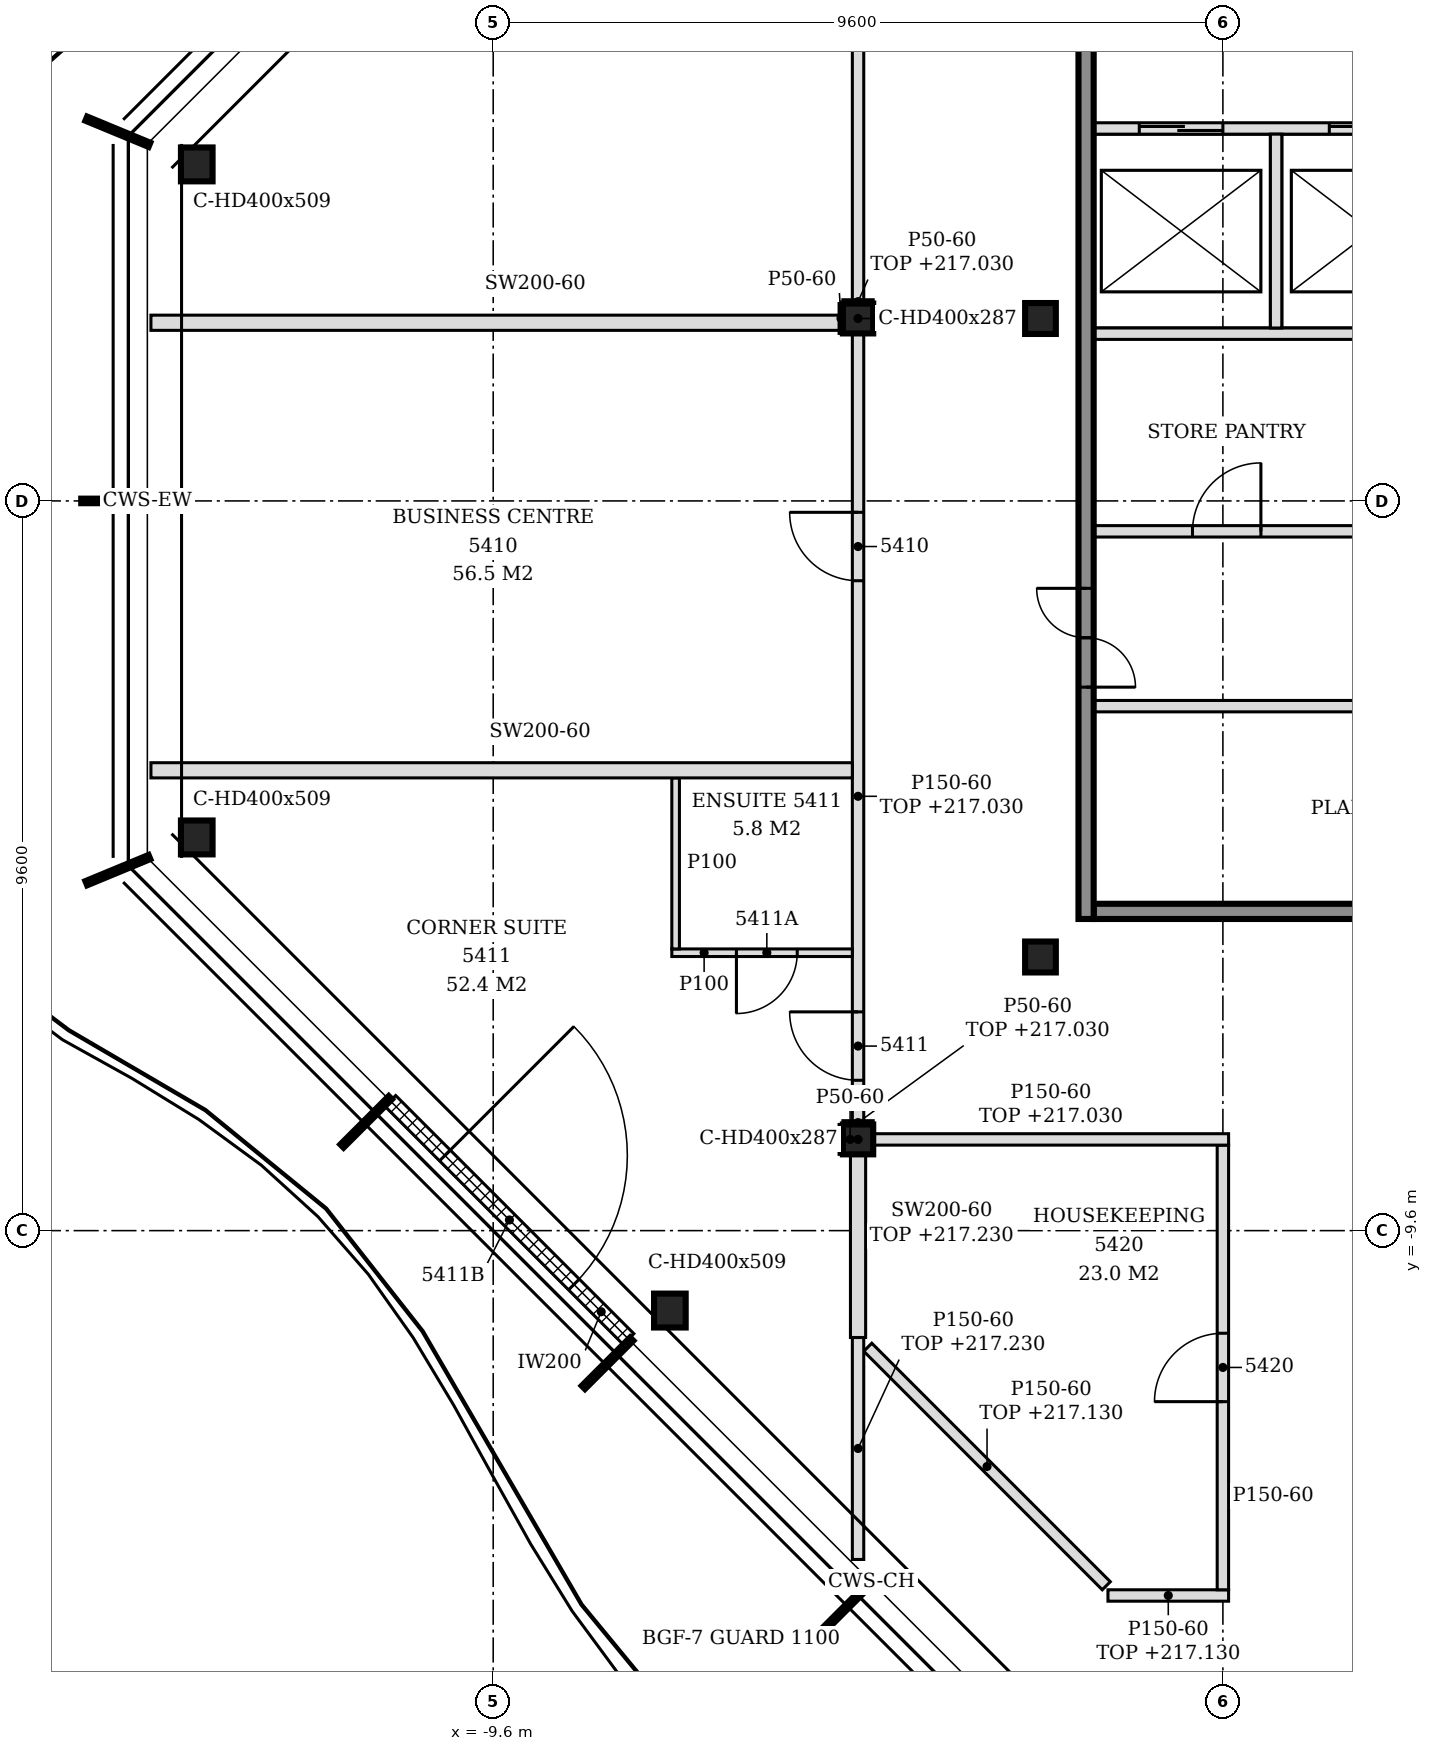
"""IFC4 building model, lengths in metres.
Left out: names, types, materials, properties, quantities, classifications, styles, units other than length and angle.
Written with IfcOpenShell. Run it as: python <this file> out.ifc"""

import sys

from ifc_helpers import new_model, si_unit, direction, frame, frame_2d, origin, origin_2d, place, context, subcontext, project, spatial, polyline, rectangle, i_section, outline, extrude, element, fill, save


model = new_model("IFC4")
c1 = context("Model", 3, precision=1e-05, world=origin(), true_north=direction((0.0, 1.0)))
c2 = subcontext(c1, "Body", "Model", "MODEL_VIEW")
j1 = project(units=[si_unit("LENGTHUNIT", "METRE"), si_unit("PLANEANGLEUNIT", "RADIAN")], contexts=[c1])
p1 = place(None, origin())
s1 = spatial("IfcSite", under=j1, at=p1, CompositionType="ELEMENT")
p2 = place(p1, origin())
s2 = spatial("IfcBuilding", under=s1, at=p2, CompositionType="ELEMENT")
p3 = place(p2, frame((0.0, 0.0, 214.2)))
s3 = spatial("IfcBuildingStorey", under=s2, at=p3, CompositionType="ELEMENT", Elevation=214.2)
for number, where, z_axis, x_axis in (
    (1, (-13.5, 4.427, -0.15), (0.0, 0.0, 1.0), (1.0, 0.0, 0.0)),
    (2, (-13.5, -4.427, -0.15), (0.0, 0.0, 1.0), (1.0, 0.0, 0.0)),
    (3, (-7.276, -10.652, -0.15), (0.0, 0.0, 1.0), (1.0, 0.0, 0.0)),
):
    element("IfcColumn", number, at=place(p3, frame(where, z_axis=z_axis, x_axis=x_axis)), inside=s3, PredefinedType="COLUMN", context=c2, shape_type="SweptSolid", body=[
        extrude(i_section(OverallWidth=0.416, OverallDepth=0.446, WebThickness=0.039, FlangeThickness=0.063, FilletRadius=0.015, at=origin_2d()), origin(), (0.0, 0.0, 1.0), 3.6),
    ])
for number, where, z_axis, x_axis in (
    (4, (-4.8, -8.4, -0.15), (0.0, 0.0, 1.0), (1.0, 0.0, 0.0)),
    (5, (-4.8, 2.4, -0.15), (0.0, 0.0, 1.0), (1.0, 0.0, 0.0)),
):
    element("IfcColumn", number, at=place(p3, frame(where, z_axis=z_axis, x_axis=x_axis)), inside=s3, PredefinedType="COLUMN", context=c2, shape_type="SweptSolid", body=[
        extrude(i_section(OverallWidth=0.399, OverallDepth=0.393, WebThickness=0.023, FlangeThickness=0.037, FilletRadius=0.015, at=origin_2d()), origin(), (0.0, 0.0, 1.0), 3.6),
    ])
for number, where, z_axis, x_axis in (
    (6, (-2.4, -6.0, -0.15), (0.0, 0.0, 1.0), (1.0, 0.0, 0.0)),
    (7, (-2.4, 2.4, -0.15), (0.0, 0.0, 1.0), (1.0, 0.0, 0.0)),
):
    element("IfcColumn", number, at=place(p3, frame(where, z_axis=z_axis, x_axis=x_axis)), inside=s3, PredefinedType="COLUMN", context=c2, shape_type="SweptSolid", body=[
        extrude(i_section(OverallWidth=0.404, OverallDepth=0.407, WebThickness=0.027, FlangeThickness=0.044, FilletRadius=0.015, at=origin_2d()), origin(), (0.0, 0.0, 1.0), 3.6),
    ])
p4 = place(p3, frame((-10.953, -7.893, 0.0), z_axis=(0.0, 0.0, 1.0), x_axis=(0.707106781187, -0.707106781187, 0.0)))
e8 = element("IfcWall", 8, at=p4, inside=s3, PredefinedType="NOTDEFINED", context=c2, shape_type="SweptSolid", body=[
    extrude(rectangle(XDim=4.431, YDim=0.2, at=frame_2d((2.215, 0.0))), origin(), (0.0, 0.0, 1.0), 3.45),
])
p5 = place(p4, frame((1.015, 0.0, 0.0)))
e9 = element("IfcOpeningElement", 9, at=p5, cuts=e8, PredefinedType="OPENING", context=c2, shape_type="SweptSolid", body=[
    extrude(rectangle(XDim=2.4, YDim=2.4, at=frame_2d((1.2, 1.2))), frame((0.0, 0.11, 0.0), z_axis=(0.0, -1.0, 0.0), x_axis=(1.0, 0.0, 0.0)), (0.0, 0.0, 1.0), 0.22),
])
p6 = place(p3, frame((-1.7, -5.4, 0.0), z_axis=(0.0, 0.0, 1.0), x_axis=(1.0, 0.0, 0.0)))
e10 = element("IfcWall", 10, at=p6, inside=s3, PredefinedType="SOLIDWALL", context=c2, shape_type="SweptSolid", body=[
    extrude(rectangle(XDim=7.9, YDim=0.2, at=frame_2d((3.95, 0.0))), origin(), (0.0, 0.0, 1.0), 3.45),
])
p7 = place(p3, frame((-1.7, -2.7, 0.0), z_axis=(0.0, 0.0, 1.0), x_axis=(1.0, 0.0, 0.0)))
e11 = element("IfcWall", 11, at=p7, inside=s3, PredefinedType="PARTITIONING", context=c2, shape_type="SweptSolid", body=[
    extrude(rectangle(XDim=7.825, YDim=0.15, at=frame_2d((3.913, 0.0))), origin(), (0.0, 0.0, 1.0), 3.45),
])
p8 = place(p7, frame((3.45, 0.0, 0.0)))
e12 = element("IfcOpeningElement", 12, at=p8, cuts=e11, PredefinedType="OPENING", context=c2, shape_type="SweptSolid", body=[
    extrude(rectangle(XDim=0.9, YDim=2.1, at=frame_2d((0.45, 1.05))), frame((0.0, 0.085, 0.0), z_axis=(0.0, -1.0, 0.0), x_axis=(1.0, 0.0, 0.0)), (0.0, 0.0, 1.0), 0.17),
])
p9 = place(p3, frame((-1.7, -0.4, 0.0), z_axis=(0.0, 0.0, 1.0), x_axis=(1.0, 0.0, 0.0)))
e13 = element("IfcWall", 13, at=p9, inside=s3, PredefinedType="PARTITIONING", context=c2, shape_type="SweptSolid", body=[
    extrude(rectangle(XDim=10.825, YDim=0.15, at=frame_2d((5.413, 0.0))), origin(), (0.0, 0.0, 1.0), 3.45),
])
p10 = place(p9, frame((1.3, 0.0, 0.0)))
e14 = element("IfcOpeningElement", 14, at=p10, cuts=e13, PredefinedType="OPENING", context=c2, shape_type="SweptSolid", body=[
    extrude(rectangle(XDim=0.9, YDim=2.1, at=frame_2d((0.45, 1.05))), frame((0.0, 0.085, 0.0), z_axis=(0.0, -1.0, 0.0), x_axis=(1.0, 0.0, 0.0)), (0.0, 0.0, 1.0), 0.17),
])
p11 = place(p9, frame((6.8, 0.0, 0.0)))
e15 = element("IfcOpeningElement", 15, at=p11, cuts=e13, PredefinedType="OPENING", context=c2, shape_type="SweptSolid", body=[
    extrude(rectangle(XDim=0.9, YDim=2.1, at=frame_2d((0.45, 1.05))), frame((0.0, 0.085, 0.0), z_axis=(0.0, -1.0, 0.0), x_axis=(1.0, 0.0, 0.0)), (0.0, 0.0, 1.0), 0.17),
])
p12 = place(p3, frame((-1.7, 2.2, 0.0), z_axis=(0.0, 0.0, 1.0), x_axis=(1.0, 0.0, 0.0)))
e16 = element("IfcWall", 16, at=p12, inside=s3, PredefinedType="SOLIDWALL", context=c2, shape_type="SweptSolid", body=[
    extrude(rectangle(XDim=4.9, YDim=0.15, at=frame_2d((2.45, 0.0))), origin(), (0.0, 0.0, 1.0), 3.45),
])
p13 = place(p3, frame((-1.7, 4.9, 0.0), z_axis=(0.0, 0.0, 1.0), x_axis=(1.0, 0.0, 0.0)))
e17 = element("IfcWall", 17, at=p13, inside=s3, PredefinedType="SOLIDWALL", context=c2, shape_type="SweptSolid", body=[
    extrude(rectangle(XDim=4.9, YDim=0.15, at=frame_2d((2.45, 0.0))), origin(), (0.0, 0.0, 1.0), 3.45),
])
p14 = place(p13, frame((0.6, 0.0, 0.0)))
e18 = element("IfcOpeningElement", 18, at=p14, cuts=e17, PredefinedType="OPENING", context=c2, shape_type="SweptSolid", body=[
    extrude(rectangle(XDim=1.1, YDim=2.1, at=frame_2d((0.55, 1.05))), frame((0.0, 0.085, 0.0), z_axis=(0.0, -1.0, 0.0), x_axis=(1.0, 0.0, 0.0)), (0.0, 0.0, 1.0), 0.17),
])
p15 = place(p13, frame((3.1, 0.0, 0.0)))
e19 = element("IfcOpeningElement", 19, at=p15, cuts=e17, PredefinedType="OPENING", context=c2, shape_type="SweptSolid", body=[
    extrude(rectangle(XDim=1.1, YDim=2.1, at=frame_2d((0.55, 1.05))), frame((0.0, 0.085, 0.0), z_axis=(0.0, -1.0, 0.0), x_axis=(1.0, 0.0, 0.0)), (0.0, 0.0, 1.0), 0.17),
])
p16 = place(p3, frame((-1.8, -5.5, 0.0), z_axis=(0.0, 0.0, 1.0), x_axis=(0.0, 1.0, 0.0)))
e20 = element("IfcWall", 20, at=p16, inside=s3, PredefinedType="SOLIDWALL", context=c2, shape_type="SweptSolid", body=[
    extrude(rectangle(XDim=15.8, YDim=0.2, at=frame_2d((7.9, 0.0))), origin(), (0.0, 0.0, 1.0), 3.45),
])
p17 = place(p16, frame((3.05, 0.0, 0.0)))
e21 = element("IfcOpeningElement", 21, at=p17, cuts=e20, PredefinedType="OPENING", context=c2, shape_type="SweptSolid", body=[
    extrude(rectangle(XDim=1.3, YDim=2.1, at=frame_2d((0.65, 1.05))), frame((0.0, 0.11, 0.0), z_axis=(0.0, -1.0, 0.0), x_axis=(1.0, 0.0, 0.0)), (0.0, 0.0, 1.0), 0.22),
])
p18 = place(p16, frame((11.45, 0.0, 0.0)))
e22 = element("IfcOpeningElement", 22, at=p18, cuts=e20, PredefinedType="OPENING", context=c2, shape_type="SweptSolid", body=[
    extrude(rectangle(XDim=1.3, YDim=2.1, at=frame_2d((0.65, 1.05))), frame((0.0, 0.11, 0.0), z_axis=(0.0, -1.0, 0.0), x_axis=(1.0, 0.0, 0.0)), (0.0, 0.0, 1.0), 0.22),
])
p19 = place(p3, frame((0.7, 2.275, 0.0), z_axis=(0.0, 0.0, 1.0), x_axis=(0.0, 1.0, 0.0)))
e23 = element("IfcWall", 23, at=p19, inside=s3, PredefinedType="SOLIDWALL", context=c2, shape_type="SweptSolid", body=[
    extrude(rectangle(XDim=2.55, YDim=0.15, at=frame_2d((1.275, 0.0))), origin(), (0.0, 0.0, 1.0), 3.45),
])
p20 = place(p3, frame((-1.512, -14.4, 0.0), z_axis=(0.0, 0.0, 1.0), x_axis=(1.0, 0.0, 0.0)))
e24 = element("IfcWall", 24, at=p20, inside=s3, PredefinedType="PARTITIONING", context=c2, shape_type="SweptSolid", body=[
    extrude(rectangle(XDim=1.587, YDim=0.15, at=frame_2d((0.793, 0.0))), origin(), (0.0, 0.0, 1.0), 2.93),
])
p21 = place(p3, frame((-1.534, -14.272, 0.0), z_axis=(0.0, 0.0, 1.0), x_axis=(-0.707134287042, 0.707079274261, 0.0)))
e25 = element("IfcWall", 25, at=p21, inside=s3, PredefinedType="PARTITIONING", context=c2, shape_type="SweptSolid", body=[
    extrude(rectangle(XDim=4.438, YDim=0.15, at=frame_2d((2.219, 0.0))), origin(), (0.0, 0.0, 1.0), 2.93),
])
p22 = place(p3, frame((0.0, -14.325, 0.0), z_axis=(0.0, 0.0, 1.0), x_axis=(0.0, 1.0, 0.0)))
e26 = element("IfcWall", 26, at=p22, inside=s3, PredefinedType="PARTITIONING", context=c2, shape_type="SweptSolid", body=[
    extrude(outline(polyline([(0.0, 0.0), (5.85, 0.0), (5.85, 2.83), (5.775, 2.83), (5.773, 3.45), (0.025, 3.45), (0.023, 2.93), (0.0, 2.93), (0.0, 0.0)])), frame((0.0, 0.075, 0.0), z_axis=(0.0, -1.0, 0.0), x_axis=(1.0, 0.0, 0.0)), (0.0, 0.0, 1.0), 0.15),
])
p23 = place(p22, frame((2.475, 0.0, 0.0)))
e27 = element("IfcOpeningElement", 27, at=p23, cuts=e26, PredefinedType="OPENING", context=c2, shape_type="SweptSolid", body=[
    extrude(rectangle(XDim=0.9, YDim=2.1, at=frame_2d((0.45, 1.05))), frame((0.0, 0.085, 0.0), z_axis=(0.0, -1.0, 0.0), x_axis=(1.0, 0.0, 0.0)), (0.0, 0.0, 1.0), 0.17),
])
p24 = place(p3, frame((-4.8, -13.926, 0.0), z_axis=(0.0, 0.0, 1.0), x_axis=(0.0, 1.0, 0.0)))
e28 = element("IfcWall", 28, at=p24, inside=s3, PredefinedType="PARTITIONING", context=c2, shape_type="SweptSolid", body=[
    extrude(outline(polyline([(0.0, 0.0), (2.92, 0.0), (2.92, 3.03), (1.369, 3.03), (1.367, 2.63), (0.229, 2.63), (0.227, 3.03), (0.0, 3.03), (0.0, 0.0)])), frame((0.0, 0.075, 0.0), z_axis=(0.0, -1.0, 0.0), x_axis=(1.0, 0.0, 0.0)), (0.0, 0.0, 1.0), 0.15),
])
p25 = place(p3, frame((-4.8, -11.006, 0.0), z_axis=(0.0, 0.0, 1.0), x_axis=(0.0, 1.0, 0.0)))
e29 = element("IfcWall", 29, at=p25, inside=s3, PredefinedType="PARTITIONING", context=c2, shape_type="SweptSolid", body=[
    extrude(rectangle(XDim=2.41, YDim=0.2, at=frame_2d((1.205, 0.0))), origin(), (0.0, 0.0, 1.0), 3.03),
])
p26 = place(p3, frame((-4.601, -8.4, 0.0), z_axis=(0.0, 0.0, 1.0), x_axis=(1.0, 0.0, 0.0)))
e30 = element("IfcWall", 30, at=p26, inside=s3, PredefinedType="PARTITIONING", context=c2, shape_type="SweptSolid", body=[
    extrude(rectangle(XDim=4.676, YDim=0.15, at=frame_2d((2.338, 0.0))), origin(), (0.0, 0.0, 1.0), 2.83),
])
p27 = place(p3, frame((-4.8, -8.204, 0.0), z_axis=(0.0, 0.0, 1.0), x_axis=(0.0, 1.0, 0.0)))
e31 = element("IfcWall", 31, at=p27, inside=s3, PredefinedType="PARTITIONING", context=c2, shape_type="SweptSolid", body=[
    extrude(rectangle(XDim=10.407, YDim=0.15, at=frame_2d((5.204, 0.0))), origin(), (0.0, 0.0, 1.0), 2.83),
])
p28 = place(p27, frame((7.154, 0.0, 0.0)))
e32 = element("IfcOpeningElement", 32, at=p28, cuts=e31, PredefinedType="OPENING", context=c2, shape_type="SweptSolid", body=[
    extrude(rectangle(XDim=0.9, YDim=2.1, at=frame_2d((0.45, 1.05))), frame((0.0, 0.085, 0.0), z_axis=(0.0, -1.0, 0.0), x_axis=(1.0, 0.0, 0.0)), (0.0, 0.0, 1.0), 0.17),
])
p29 = place(p27, frame((0.582, 0.0, 0.0)))
e33 = element("IfcOpeningElement", 33, at=p29, cuts=e31, PredefinedType="OPENING", context=c2, shape_type="SweptSolid", body=[
    extrude(rectangle(XDim=0.9, YDim=2.1, at=frame_2d((0.45, 1.05))), frame((0.0, 0.085, 0.0), z_axis=(0.0, -1.0, 0.0), x_axis=(1.0, 0.0, 0.0)), (0.0, 0.0, 1.0), 0.17),
])
p30 = place(p3, frame((-7.25, -5.944, 0.0), z_axis=(0.0, 0.0, 1.0), x_axis=(1.0, 0.0, 0.0)))
e34 = element("IfcWall", 34, at=p30, inside=s3, PredefinedType="PARTITIONING", context=c2, shape_type="SweptSolid", body=[
    extrude(outline(polyline([(0.0, 0.0), (2.375, 0.0), (2.375, 2.83), (2.3, 2.83), (2.298, 3.45), (0.0, 3.45), (0.0, 0.0)])), frame((0.0, 0.05, 0.0), z_axis=(0.0, -1.0, 0.0), x_axis=(1.0, 0.0, 0.0)), (0.0, 0.0, 1.0), 0.1),
])
p31 = place(p30, frame((0.85, 0.0, 0.0)))
e35 = element("IfcOpeningElement", 35, at=p31, cuts=e34, PredefinedType="OPENING", context=c2, shape_type="SweptSolid", body=[
    extrude(rectangle(XDim=0.8, YDim=2.1, at=frame_2d((0.4, 1.05))), frame((0.0, 0.06, 0.0), z_axis=(0.0, -1.0, 0.0), x_axis=(1.0, 0.0, 0.0)), (0.0, 0.0, 1.0), 0.12),
])
p32 = place(p3, frame((-7.2, -5.894, 0.0), z_axis=(0.0, 0.0, 1.0), x_axis=(0.0, 1.0, 0.0)))
e36 = element("IfcWall", 36, at=p32, inside=s3, PredefinedType="PARTITIONING", context=c2, shape_type="SweptSolid", body=[
    extrude(outline(polyline([(0.0, 0.0), (2.25, 0.0), (2.25, 3.45), (1.189, 3.45), (1.187, 2.98), (0.999, 2.98), (0.997, 3.45), (0.0, 3.45), (0.0, 0.0)])), frame((0.0, 0.05, 0.0), z_axis=(0.0, -1.0, 0.0), x_axis=(1.0, 0.0, 0.0)), (0.0, 0.0, 1.0), 0.1),
])
p33 = place(p3, frame((-14.103, -3.544, 0.0), z_axis=(0.0, 0.0, 1.0), x_axis=(1.0, 0.0, 0.0)))
e37 = element("IfcWall", 37, at=p33, inside=s3, PredefinedType="PARTITIONING", context=c2, shape_type="SweptSolid", body=[
    extrude(outline(polyline([(0.0, 0.0), (9.228, 0.0), (9.228, 2.83), (9.153, 2.83), (9.151, 3.45), (0.753, 3.45), (0.751, 2.93), (0.453, 2.93), (0.451, 3.45), (0.0, 3.45), (0.0, 0.0)])), frame((0.0, 0.1, 0.0), z_axis=(0.0, -1.0, 0.0), x_axis=(1.0, 0.0, 0.0)), (0.0, 0.0, 1.0), 0.2),
])
p34 = place(p3, frame((-14.103, 2.344, 0.0), z_axis=(0.0, 0.0, 1.0), x_axis=(1.0, 0.0, 0.0)))
e38 = element("IfcWall", 38, at=p34, inside=s3, PredefinedType="PARTITIONING", context=c2, shape_type="SweptSolid", body=[
    extrude(outline(polyline([(0.0, 0.0), (9.104, 0.0), (9.104, 3.45), (0.753, 3.45), (0.751, 2.93), (0.453, 2.93), (0.451, 3.45), (0.0, 3.45), (0.0, 0.0)])), frame((0.0, 0.1, 0.0), z_axis=(0.0, -1.0, 0.0), x_axis=(1.0, 0.0, 0.0)), (0.0, 0.0, 1.0), 0.2),
])
p35 = place(p3, frame((-4.8, 2.596, 0.0), z_axis=(0.0, 0.0, 1.0), x_axis=(0.0, 1.0, 0.0)))
e39 = element("IfcWall", 39, at=p35, inside=s3, PredefinedType="PARTITIONING", context=c2, shape_type="SweptSolid", body=[
    extrude(outline(polyline([(0.0, 0.0), (10.407, 0.0), (10.407, 2.63), (9.961, 2.63), (9.959, 2.83), (0.0, 2.83), (0.0, 0.0)])), frame((0.0, 0.075, 0.0), z_axis=(0.0, -1.0, 0.0), x_axis=(1.0, 0.0, 0.0)), (0.0, 0.0, 1.0), 0.15),
])
for number, where, z_axis, x_axis in (
    (40, (-5.024, -8.596, 0.0), (0.0, 0.0, 1.0), (0.0, 1.0, 0.0)),
    (41, (-5.024, 2.204, 0.0), (0.0, 0.0, 1.0), (0.0, 1.0, 0.0)),
):
    element("IfcWall", number, at=place(p3, frame(where, z_axis=z_axis, x_axis=x_axis)), inside=s3, PredefinedType="PARTITIONING", context=c2, shape_type="SweptSolid", body=[
        extrude(rectangle(XDim=0.393, YDim=0.05, at=frame_2d((0.196, 0.0))), origin(), (0.0, 0.0, 1.0), 3.45),
    ])
for number, where, z_axis, x_axis in (
    (42, (-5.0, -8.178, 0.0), (0.0, 0.0, 1.0), (1.0, 0.0, 0.0)),
    (43, (-5.0, 2.622, 0.0), (0.0, 0.0, 1.0), (1.0, 0.0, 0.0)),
):
    element("IfcWall", number, at=place(p3, frame(where, z_axis=z_axis, x_axis=x_axis)), inside=s3, PredefinedType="PARTITIONING", context=c2, shape_type="SweptSolid", body=[
        extrude(rectangle(XDim=0.399, YDim=0.05, at=frame_2d((0.199, 0.0))), origin(), (0.0, 0.0, 1.0), 2.83),
    ])
p36 = place(p5, origin())
e44 = element("IfcDoor", 44, at=p36, inside=s3, OperationType="SINGLE_SWING_LEFT", PredefinedType="DOOR", context=c2, shape_type="SweptSolid", body=[
    extrude(rectangle(XDim=2.4, YDim=2.4, at=frame_2d((1.2, 1.2))), frame((0.0, 0.025, 0.0), z_axis=(0.0, -1.0, 0.0), x_axis=(1.0, 0.0, 0.0)), (0.0, 0.0, 1.0), 0.05),
])
fill(e9, e44)
p37 = place(p14, origin())
e45 = element("IfcDoor", 45, at=p37, inside=s3, OperationType="DOUBLE_DOOR_SLIDING", PredefinedType="DOOR", context=c2, shape_type="SweptSolid", body=[
    extrude(rectangle(XDim=1.1, YDim=2.1, at=frame_2d((0.55, 1.05))), frame((0.0, 0.025, 0.0), z_axis=(0.0, -1.0, 0.0), x_axis=(1.0, 0.0, 0.0)), (0.0, 0.0, 1.0), 0.05),
])
fill(e18, e45)
p38 = place(p15, origin())
e46 = element("IfcDoor", 46, at=p38, inside=s3, OperationType="DOUBLE_DOOR_SLIDING", PredefinedType="DOOR", context=c2, shape_type="SweptSolid", body=[
    extrude(rectangle(XDim=1.1, YDim=2.1, at=frame_2d((0.55, 1.05))), frame((0.0, 0.025, 0.0), z_axis=(0.0, -1.0, 0.0), x_axis=(1.0, 0.0, 0.0)), (0.0, 0.0, 1.0), 0.05),
])
fill(e19, e46)
p39 = place(p17, origin())
e47 = element("IfcDoor", 47, at=p39, inside=s3, OperationType="DOUBLE_DOOR_SINGLE_SWING", PredefinedType="DOOR", context=c2, shape_type="SweptSolid", body=[
    extrude(rectangle(XDim=1.3, YDim=2.1, at=frame_2d((0.65, 1.05))), frame((0.0, 0.025, 0.0), z_axis=(0.0, -1.0, 0.0), x_axis=(1.0, 0.0, 0.0)), (0.0, 0.0, 1.0), 0.05),
])
fill(e21, e47)
p40 = place(p10, origin())
e48 = element("IfcDoor", 48, at=p40, inside=s3, OperationType="SINGLE_SWING_RIGHT", PredefinedType="DOOR", context=c2, shape_type="SweptSolid", body=[
    extrude(rectangle(XDim=0.9, YDim=2.1, at=frame_2d((0.45, 1.05))), frame((0.0, 0.025, 0.0), z_axis=(0.0, -1.0, 0.0), x_axis=(1.0, 0.0, 0.0)), (0.0, 0.0, 1.0), 0.05),
])
fill(e14, e48)
p41 = place(p28, origin())
e49 = element("IfcDoor", 49, at=p41, inside=s3, OperationType="SINGLE_SWING_RIGHT", PredefinedType="DOOR", context=c2, shape_type="SweptSolid", body=[
    extrude(rectangle(XDim=0.9, YDim=2.1, at=frame_2d((0.45, 1.05))), frame((0.0, 0.025, 0.0), z_axis=(0.0, -1.0, 0.0), x_axis=(1.0, 0.0, 0.0)), (0.0, 0.0, 1.0), 0.05),
])
fill(e32, e49)
p42 = place(p29, origin())
e50 = element("IfcDoor", 50, at=p42, inside=s3, OperationType="SINGLE_SWING_RIGHT", PredefinedType="DOOR", context=c2, shape_type="SweptSolid", body=[
    extrude(rectangle(XDim=0.9, YDim=2.1, at=frame_2d((0.45, 1.05))), frame((0.0, 0.025, 0.0), z_axis=(0.0, -1.0, 0.0), x_axis=(1.0, 0.0, 0.0)), (0.0, 0.0, 1.0), 0.05),
])
fill(e33, e50)
p43 = place(p31, frame((0.8, 0.0, 0.0), z_axis=(0.0, 0.0, 1.0), x_axis=(-1.0, 0.0, 0.0)))
e51 = element("IfcDoor", 51, at=p43, inside=s3, OperationType="SINGLE_SWING_RIGHT", PredefinedType="DOOR", context=c2, shape_type="SweptSolid", body=[
    extrude(rectangle(XDim=0.8, YDim=2.1, at=frame_2d((0.4, 1.05))), frame((0.0, 0.025, 0.0), z_axis=(0.0, -1.0, 0.0), x_axis=(1.0, 0.0, 0.0)), (0.0, 0.0, 1.0), 0.05),
])
fill(e35, e51)
p44 = place(p23, origin())
e52 = element("IfcDoor", 52, at=p44, inside=s3, OperationType="SINGLE_SWING_LEFT", PredefinedType="DOOR", context=c2, shape_type="SweptSolid", body=[
    extrude(rectangle(XDim=0.9, YDim=2.1, at=frame_2d((0.45, 1.05))), frame((0.0, 0.025, 0.0), z_axis=(0.0, -1.0, 0.0), x_axis=(1.0, 0.0, 0.0)), (0.0, 0.0, 1.0), 0.05),
])
fill(e27, e52)
save(model, sys.argv[1])
